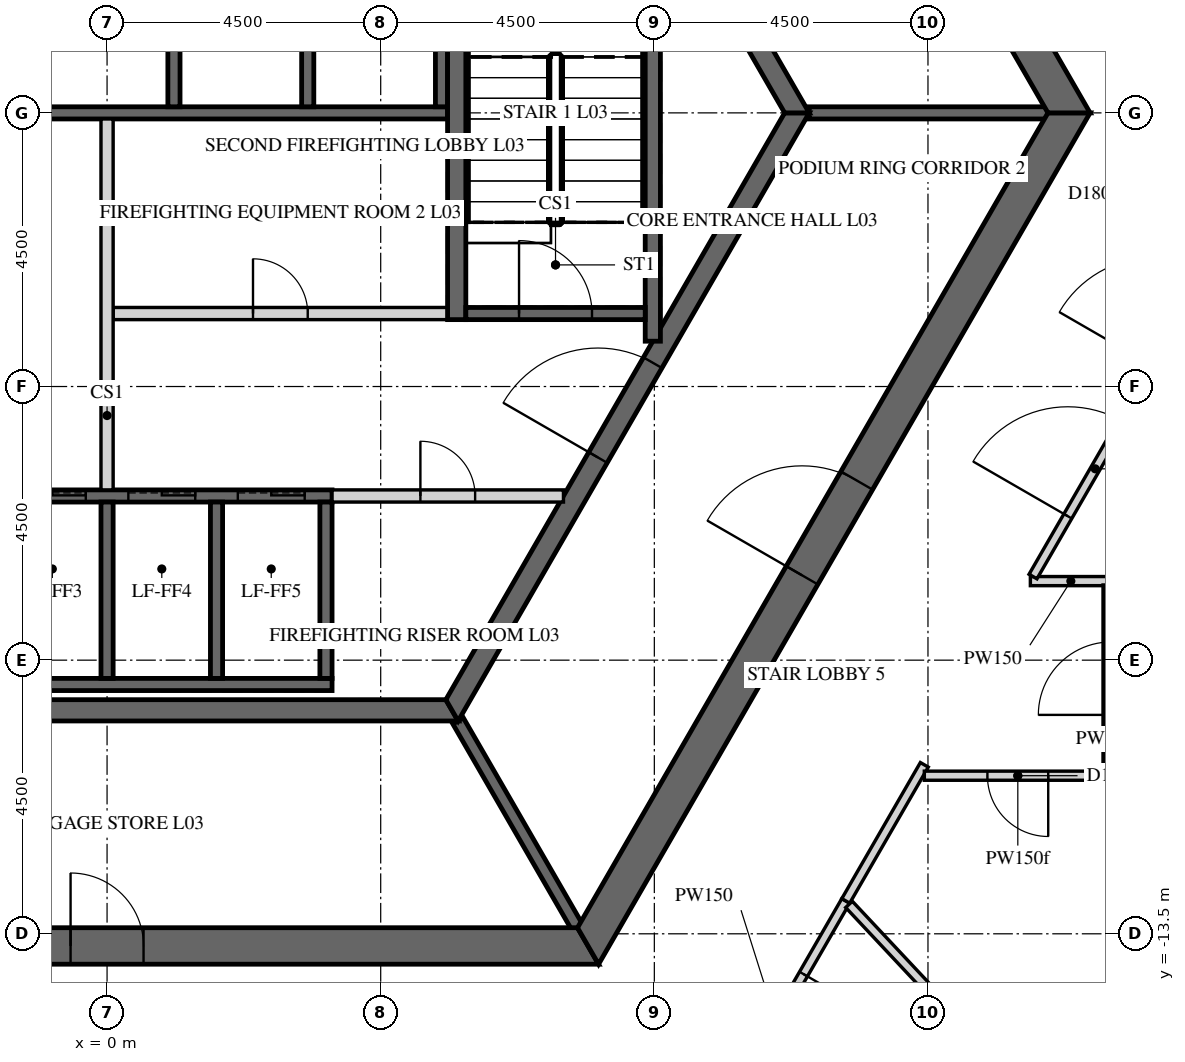
"""IFC4 building model, lengths in metres.
Left out: names, types, materials, properties, quantities, classifications, styles, units other than length and angle.
Written with IfcOpenShell. Run it as: python <this file> out.ifc"""

import sys

from ifc_helpers import new_model, si_unit, direction, frame, frame_2d, origin, place, context, subcontext, project, spatial, polyline, rectangle, outline, extrude, element, fill, save


model = new_model("IFC4")
c1 = context("Model", 3, precision=1e-05, world=origin(), true_north=direction((0.0, 1.0)))
c2 = subcontext(c1, "Body", "Model", "MODEL_VIEW")
j1 = project(units=[si_unit("LENGTHUNIT", "METRE"), si_unit("PLANEANGLEUNIT", "RADIAN")], contexts=[c1])
p1 = place(None, origin())
s1 = spatial("IfcSite", under=j1, at=p1, CompositionType="ELEMENT")
p2 = place(p1, origin())
s2 = spatial("IfcBuilding", under=s1, at=p2, CompositionType="ELEMENT")
p3 = place(p2, frame((0.0, 0.0, 20.5)))
s3 = spatial("IfcBuildingStorey", under=s2, at=p3, CompositionType="ELEMENT", Elevation=20.5)
p4 = place(p3, frame((-7.91, -13.7, -0.25), z_axis=(0.0, 0.0, 1.0), x_axis=(1.0, 0.0, 0.0)))
e1 = element("IfcWall", 1, at=p4, inside=s3, PredefinedType="SHEAR", context=c2, shape_type="SweptSolid", body=[
    extrude(outline(polyline([(-0.173, -0.3), (15.993, -0.3), (15.646, 0.3), (0.173, 0.3), (-0.173, -0.3)])), origin(), (0.0, 0.0, 1.0), 5.5),
])
p5 = place(p4, frame((7.31, 0.0, 0.25)))
e2 = element("IfcOpeningElement", 2, at=p5, cuts=e1, PredefinedType="OPENING", context=c2, shape_type="SweptSolid", body=[
    extrude(rectangle(XDim=1.2, YDim=2.4, at=frame_2d((0.6, 1.2))), frame((0.0, 0.31, 0.0), z_axis=(0.0, -1.0, 0.0), x_axis=(1.0, 0.0, 0.0)), (0.0, 0.0, 1.0), 0.62),
])
p6 = place(p3, frame((7.91, -13.7, -0.25), z_axis=(0.0, 0.0, 1.0), x_axis=(0.499999880136, 0.866025472988, 0.0)))
e3 = element("IfcWall", 3, at=p6, inside=s3, PredefinedType="SHEAR", context=c2, shape_type="SweptSolid", body=[
    extrude(outline(polyline([(-0.173, -0.3), (15.993, -0.3), (15.646, 0.3), (0.173, 0.3), (-0.173, -0.3)])), origin(), (0.0, 0.0, 1.0), 5.5),
])
p7 = place(p6, frame((7.039, 0.0, 0.25)))
e4 = element("IfcOpeningElement", 4, at=p7, cuts=e3, PredefinedType="OPENING", context=c2, shape_type="SweptSolid", body=[
    extrude(rectangle(XDim=1.8, YDim=2.4, at=frame_2d((0.9, 1.2))), frame((0.0, 0.31, 0.0), z_axis=(0.0, -1.0, 0.0), x_axis=(1.0, 0.0, 0.0)), (0.0, 0.0, 1.0), 0.62),
])
p8 = place(p3, frame((15.819, 0.0, -0.25), z_axis=(0.0, 0.0, 1.0), x_axis=(-0.499999880136, 0.866025472988, 0.0)))
e5 = element("IfcWall", 5, at=p8, inside=s3, PredefinedType="SHEAR", context=c2, shape_type="SweptSolid", body=[
    extrude(outline(polyline([(-0.173, -0.3), (15.993, -0.3), (15.646, 0.3), (0.173, 0.3), (-0.173, -0.3)])), origin(), (0.0, 0.0, 1.0), 5.5),
])
p9 = place(p8, frame((6.981, 0.0, 0.25)))
e6 = element("IfcOpeningElement", 6, at=p9, cuts=e5, PredefinedType="OPENING", context=c2, shape_type="SweptSolid", body=[
    extrude(rectangle(XDim=1.8, YDim=2.4, at=frame_2d((0.9, 1.2))), frame((0.0, 0.31, 0.0), z_axis=(0.0, -1.0, 0.0), x_axis=(1.0, 0.0, 0.0)), (0.0, 0.0, 1.0), 0.62),
])
p10 = place(p3, frame((-5.673, -9.825, -0.25), z_axis=(0.0, 0.0, 1.0), x_axis=(1.0, 0.0, 0.0)))
e7 = element("IfcWall", 7, at=p10, inside=s3, PredefinedType="SHEAR", context=c2, shape_type="SweptSolid", body=[
    extrude(outline(polyline([(-0.101, -0.175), (11.446, -0.175), (11.244, 0.175), (0.101, 0.175), (-0.101, -0.175)])), origin(), (0.0, 0.0, 1.0), 5.5),
])
p11 = place(p3, frame((5.673, -9.825, -0.25), z_axis=(0.0, 0.0, 1.0), x_axis=(0.499995046907, 0.866028263435, 0.0)))
e8 = element("IfcWall", 8, at=p11, inside=s3, PredefinedType="SHEAR", context=c2, shape_type="SweptSolid", body=[
    extrude(outline(polyline([(-0.101, -0.175), (11.446, -0.175), (11.244, 0.175), (0.101, 0.175), (-0.101, -0.175)])), origin(), (0.0, 0.0, 1.0), 5.5),
])
p12 = place(p11, frame((4.801, 0.0, 0.25)))
e9 = element("IfcOpeningElement", 9, at=p12, cuts=e8, PredefinedType="OPENING", context=c2, shape_type="SweptSolid", body=[
    extrude(rectangle(XDim=1.8, YDim=2.4, at=frame_2d((0.9, 1.2))), frame((0.0, 0.185, 0.0), z_axis=(0.0, -1.0, 0.0), x_axis=(1.0, 0.0, 0.0)), (0.0, 0.0, 1.0), 0.37),
])
p13 = place(p3, frame((11.345, 0.0, -0.25), z_axis=(0.0, 0.0, 1.0), x_axis=(-0.499995046907, 0.866028263435, 0.0)))
e10 = element("IfcWall", 10, at=p13, inside=s3, PredefinedType="SHEAR", context=c2, shape_type="SweptSolid", body=[
    extrude(outline(polyline([(-0.101, -0.175), (11.446, -0.175), (11.244, 0.175), (0.101, 0.175), (-0.101, -0.175)])), origin(), (0.0, 0.0, 1.0), 5.5),
])
p14 = place(p13, frame((4.744, 0.0, 0.25)))
e11 = element("IfcOpeningElement", 11, at=p14, cuts=e10, PredefinedType="OPENING", context=c2, shape_type="SweptSolid", body=[
    extrude(rectangle(XDim=1.8, YDim=2.4, at=frame_2d((0.9, 1.2))), frame((0.0, 0.185, 0.0), z_axis=(0.0, -1.0, 0.0), x_axis=(1.0, 0.0, 0.0)), (0.0, 0.0, 1.0), 0.37),
])
p15 = place(p3, frame((-5.6, 0.0, -0.25), z_axis=(0.0, 0.0, 1.0), x_axis=(1.0, 0.0, 0.0)))
e12 = element("IfcWall", 12, at=p15, inside=s3, PredefinedType="SHEAR", context=c2, shape_type="SweptSolid", body=[
    extrude(rectangle(XDim=11.2, YDim=0.2, at=frame_2d((5.6, 0.0))), origin(), (0.0, 0.0, 1.0), 5.5),
])
for number, where, z_axis, x_axis in (
    (13, (1.1, 0.1, -0.25), (0.0, 0.0, 1.0), (0.0, 1.0, 0.0)),
    (14, (3.3, 0.1, -0.25), (0.0, 0.0, 1.0), (0.0, 1.0, 0.0)),
    (15, (5.5, 0.1, -0.25), (0.0, 0.0, 1.0), (0.0, 1.0, 0.0)),
):
    element("IfcWall", number, at=place(p3, frame(where, z_axis=z_axis, x_axis=x_axis)), inside=s3, PredefinedType="SHEAR", context=c2, shape_type="SweptSolid", body=[
        extrude(rectangle(XDim=3.1, YDim=0.2, at=frame_2d((1.55, 0.0))), origin(), (0.0, 0.0, 1.0), 5.5),
    ])
p16 = place(p3, frame((-5.5, -6.3, -0.25), z_axis=(0.0, 0.0, 1.0), x_axis=(1.0, 0.0, 0.0)))
e16 = element("IfcWall", 16, at=p16, inside=s3, PredefinedType="SHEAR", context=c2, shape_type="SweptSolid", body=[
    extrude(rectangle(XDim=9.2, YDim=0.2, at=frame_2d((4.6, 0.0))), origin(), (0.0, 0.0, 1.0), 5.5),
])
p17 = place(p16, frame((0.45, 0.0, 0.25)))
e17 = element("IfcOpeningElement", 17, at=p17, cuts=e16, PredefinedType="OPENING", context=c2, shape_type="SweptSolid", body=[
    extrude(rectangle(XDim=1.1, YDim=2.1, at=frame_2d((0.55, 1.05))), frame((0.0, 0.11, 0.0), z_axis=(0.0, -1.0, 0.0), x_axis=(1.0, 0.0, 0.0)), (0.0, 0.0, 1.0), 0.22),
])
p18 = place(p16, frame((2.25, 0.0, 0.25)))
e18 = element("IfcOpeningElement", 18, at=p18, cuts=e16, PredefinedType="OPENING", context=c2, shape_type="SweptSolid", body=[
    extrude(rectangle(XDim=1.1, YDim=2.1, at=frame_2d((0.55, 1.05))), frame((0.0, 0.11, 0.0), z_axis=(0.0, -1.0, 0.0), x_axis=(1.0, 0.0, 0.0)), (0.0, 0.0, 1.0), 0.22),
])
p19 = place(p16, frame((4.05, 0.0, 0.25)))
e19 = element("IfcOpeningElement", 19, at=p19, cuts=e16, PredefinedType="OPENING", context=c2, shape_type="SweptSolid", body=[
    extrude(rectangle(XDim=1.1, YDim=2.1, at=frame_2d((0.55, 1.05))), frame((0.0, 0.11, 0.0), z_axis=(0.0, -1.0, 0.0), x_axis=(1.0, 0.0, 0.0)), (0.0, 0.0, 1.0), 0.22),
])
p20 = place(p16, frame((5.85, 0.0, 0.25)))
e20 = element("IfcOpeningElement", 20, at=p20, cuts=e16, PredefinedType="OPENING", context=c2, shape_type="SweptSolid", body=[
    extrude(rectangle(XDim=1.1, YDim=2.1, at=frame_2d((0.55, 1.05))), frame((0.0, 0.11, 0.0), z_axis=(0.0, -1.0, 0.0), x_axis=(1.0, 0.0, 0.0)), (0.0, 0.0, 1.0), 0.22),
])
p21 = place(p16, frame((7.65, 0.0, 0.25)))
e21 = element("IfcOpeningElement", 21, at=p21, cuts=e16, PredefinedType="OPENING", context=c2, shape_type="SweptSolid", body=[
    extrude(rectangle(XDim=1.1, YDim=2.1, at=frame_2d((0.55, 1.05))), frame((0.0, 0.11, 0.0), z_axis=(0.0, -1.0, 0.0), x_axis=(1.0, 0.0, 0.0)), (0.0, 0.0, 1.0), 0.22),
])
p22 = place(p3, frame((-5.5, -9.4, -0.25), z_axis=(0.0, 0.0, 1.0), x_axis=(1.0, 0.0, 0.0)))
e22 = element("IfcWall", 22, at=p22, inside=s3, PredefinedType="SHEAR", context=c2, shape_type="SweptSolid", body=[
    extrude(rectangle(XDim=9.2, YDim=0.2, at=frame_2d((4.6, 0.0))), origin(), (0.0, 0.0, 1.0), 5.5),
])
for number, where, z_axis, x_axis in (
    (23, (0.0, -9.3, -0.25), (0.0, 0.0, 1.0), (0.0, 1.0, 0.0)),
    (24, (1.8, -9.3, -0.25), (0.0, 0.0, 1.0), (0.0, 1.0, 0.0)),
    (25, (3.6, -9.3, -0.25), (0.0, 0.0, 1.0), (0.0, 1.0, 0.0)),
):
    element("IfcWall", number, at=place(p3, frame(where, z_axis=z_axis, x_axis=x_axis)), inside=s3, PredefinedType="SHEAR", context=c2, shape_type="SweptSolid", body=[
        extrude(rectangle(XDim=2.9, YDim=0.2, at=frame_2d((1.45, 0.0))), origin(), (0.0, 0.0, 1.0), 5.5),
    ])
p23 = place(p3, frame((0.1, -3.3, 0.0), z_axis=(0.0, 0.0, 1.0), x_axis=(1.0, 0.0, 0.0)))
e26 = element("IfcWall", 26, at=p23, inside=s3, PredefinedType="PARTITIONING", context=c2, shape_type="SweptSolid", body=[
    extrude(rectangle(XDim=5.5, YDim=0.2, at=frame_2d((2.75, 0.0))), origin(), (0.0, 0.0, 1.0), 5.25),
])
p24 = place(p23, frame((2.3, 0.0, 0.0)))
e27 = element("IfcOpeningElement", 27, at=p24, cuts=e26, PredefinedType="OPENING", context=c2, shape_type="SweptSolid", body=[
    extrude(rectangle(XDim=0.9, YDim=2.1, at=frame_2d((0.45, 1.05))), frame((0.0, 0.11, 0.0), z_axis=(0.0, -1.0, 0.0), x_axis=(1.0, 0.0, 0.0)), (0.0, 0.0, 1.0), 0.22),
])
p25 = place(p3, frame((0.0, -6.2, 0.0), z_axis=(0.0, 0.0, 1.0), x_axis=(0.0, 1.0, 0.0)))
e28 = element("IfcWall", 28, at=p25, inside=s3, PredefinedType="PARTITIONING", context=c2, shape_type="SweptSolid", body=[
    extrude(rectangle(XDim=6.1, YDim=0.2, at=frame_2d((3.05, 0.0))), origin(), (0.0, 0.0, 1.0), 5.25),
])
p26 = place(p3, frame((3.7, -6.3, 0.0), z_axis=(0.0, 0.0, 1.0), x_axis=(1.0, 0.0, 0.0)))
e29 = element("IfcWall", 29, at=p26, inside=s3, PredefinedType="PARTITIONING", context=c2, shape_type="SweptSolid", body=[
    extrude(rectangle(XDim=3.806, YDim=0.2, at=frame_2d((1.903, 0.0))), origin(), (0.0, 0.0, 1.0), 5.25),
])
p27 = place(p26, frame((1.453, 0.0, 0.0)))
e30 = element("IfcOpeningElement", 30, at=p27, cuts=e29, PredefinedType="OPENING", context=c2, shape_type="SweptSolid", body=[
    extrude(rectangle(XDim=0.9, YDim=2.1, at=frame_2d((0.45, 1.05))), frame((0.0, 0.11, 0.0), z_axis=(0.0, -1.0, 0.0), x_axis=(1.0, 0.0, 0.0)), (0.0, 0.0, 1.0), 0.22),
])
p28 = place(p3, frame((11.547, 0.0, -0.25), z_axis=(0.0, 0.0, 1.0), x_axis=(1.0, 0.0, 0.0)))
e31 = element("IfcWall", 31, at=p28, inside=s3, PredefinedType="SHEAR", context=c2, shape_type="SweptSolid", body=[
    extrude(rectangle(XDim=3.926, YDim=0.2, at=frame_2d((1.963, 0.0))), origin(), (0.0, 0.0, 1.0), 5.5),
])
p29 = place(p3, frame((5.773, -10.0, -0.25), z_axis=(0.0, 0.0, 1.0), x_axis=(0.500038251005, -0.86600331843, 0.0)))
e32 = element("IfcWall", 32, at=p29, inside=s3, PredefinedType="SHEAR", context=c2, shape_type="SweptSolid", body=[
    extrude(rectangle(XDim=3.926, YDim=0.2, at=frame_2d((1.963, 0.0))), origin(), (0.0, 0.0, 1.0), 5.5),
])
p30 = place(p3, frame((5.75, -3.4, -0.25), z_axis=(0.0, 0.0, 1.0), x_axis=(0.0, 1.0, 0.0)))
e33 = element("IfcWall", 33, at=p30, inside=s3, PredefinedType="SHEAR", context=c2, shape_type="SweptSolid", body=[
    extrude(rectangle(XDim=6.8, YDim=0.3, at=frame_2d((3.4, 0.0))), origin(), (0.0, 0.0, 1.0), 5.5),
])
p31 = place(p3, frame((8.975, -3.755, -0.25), z_axis=(0.0, 0.0, 1.0), x_axis=(0.0, 1.0, 0.0)))
e34 = element("IfcWall", 34, at=p31, inside=s3, PredefinedType="SHEAR", context=c2, shape_type="SweptSolid", body=[
    extrude(rectangle(XDim=7.51, YDim=0.25, at=frame_2d((3.755, 0.0))), origin(), (0.0, 0.0, 1.0), 5.5),
])
p32 = place(p3, frame((5.9, -3.3, -0.25), z_axis=(0.0, 0.0, 1.0), x_axis=(1.0, 0.0, 0.0)))
e35 = element("IfcWall", 35, at=p32, inside=s3, PredefinedType="SHEAR", context=c2, shape_type="SweptSolid", body=[
    extrude(rectangle(XDim=2.95, YDim=0.2, at=frame_2d((1.475, 0.0))), origin(), (0.0, 0.0, 1.0), 5.5),
])
p33 = place(p32, frame((0.875, 0.0, 0.25)))
e36 = element("IfcOpeningElement", 36, at=p33, cuts=e35, PredefinedType="OPENING", context=c2, shape_type="SweptSolid", body=[
    extrude(rectangle(XDim=1.2, YDim=2.4, at=frame_2d((0.6, 1.2))), frame((0.0, 0.11, 0.0), z_axis=(0.0, -1.0, 0.0), x_axis=(1.0, 0.0, 0.0)), (0.0, 0.0, 1.0), 0.22),
])
p34 = place(p3, frame((12.148, -12.959, 0.0), z_axis=(0.0, 0.0, 1.0), x_axis=(-0.499957811549, -0.866049759928, 0.0)))
e37 = element("IfcWall", 37, at=p34, inside=s3, PredefinedType="PARTITIONING", context=c2, shape_type="SweptSolid", body=[
    extrude(rectangle(XDim=4.58, YDim=0.15, at=frame_2d((2.29, 0.0))), origin(), (0.0, 0.0, 1.0), 5.25),
])
p35 = place(p34, frame((1.39, 0.0, 0.0)))
e38 = element("IfcOpeningElement", 38, at=p35, cuts=e37, PredefinedType="OPENING", context=c2, shape_type="SweptSolid", body=[
    extrude(rectangle(XDim=1.8, YDim=2.1, at=frame_2d((0.9, 1.05))), frame((0.0, 0.085, 0.0), z_axis=(0.0, -1.0, 0.0), x_axis=(1.0, 0.0, 0.0)), (0.0, 0.0, 1.0), 0.17),
])
p36 = place(p3, frame((12.148, -12.959, 0.0), z_axis=(0.0, 0.0, 1.0), x_axis=(0.499959617396, 0.866048717436, 0.0)))
e39 = element("IfcWall", 39, at=p36, inside=s3, PredefinedType="PARTITIONING", context=c2, shape_type="SweptSolid", body=[
    extrude(rectangle(XDim=2.584, YDim=0.15, at=frame_2d((1.292, 0.0))), origin(), (0.0, 0.0, 1.0), 5.25),
])
p37 = place(p3, frame((15.184, -7.7, 0.0), z_axis=(0.0, 0.0, 1.0), x_axis=(1.0, 0.0, 0.0)))
e40 = element("IfcWall", 40, at=p37, inside=s3, PredefinedType="PARTITIONING", context=c2, shape_type="SweptSolid", body=[
    extrude(rectangle(XDim=1.331, YDim=0.15, at=frame_2d((0.666, 0.0))), origin(), (0.0, 0.0, 1.0), 5.25),
])
p38 = place(p3, frame((15.227, -7.625, 0.0), z_axis=(0.0, 0.0, 1.0), x_axis=(0.500053906551, 0.865994278585, 0.0)))
e41 = element("IfcWall", 41, at=p38, inside=s3, PredefinedType="PARTITIONING", context=c2, shape_type="SweptSolid", body=[
    extrude(rectangle(XDim=6.928, YDim=0.15, at=frame_2d((3.464, 0.0))), origin(), (0.0, 0.0, 1.0), 5.25),
])
p39 = place(p38, frame((1.146, 0.0, 0.0)))
e42 = element("IfcOpeningElement", 42, at=p39, cuts=e41, PredefinedType="OPENING", context=c2, shape_type="SweptSolid", body=[
    extrude(rectangle(XDim=1.8, YDim=2.1, at=frame_2d((0.9, 1.05))), frame((0.0, 0.085, 0.0), z_axis=(0.0, -1.0, 0.0), x_axis=(1.0, 0.0, 0.0)), (0.0, 0.0, 1.0), 0.17),
])
p40 = place(p38, frame((3.983, 0.0, 0.0)))
e43 = element("IfcOpeningElement", 43, at=p40, cuts=e41, PredefinedType="OPENING", context=c2, shape_type="SweptSolid", body=[
    extrude(rectangle(XDim=1.8, YDim=2.1, at=frame_2d((0.9, 1.05))), frame((0.0, 0.085, 0.0), z_axis=(0.0, -1.0, 0.0), x_axis=(1.0, 0.0, 0.0)), (0.0, 0.0, 1.0), 0.17),
])
p41 = place(p3, frame((16.515, -10.9, 0.0), z_axis=(0.0, 0.0, 1.0), x_axis=(-1.0, 0.0, 0.0)))
e44 = element("IfcWall", 44, at=p41, inside=s3, PredefinedType="PARTITIONING", context=c2, shape_type="SweptSolid", body=[
    extrude(rectangle(XDim=3.075, YDim=0.15, at=frame_2d((1.538, 0.0))), origin(), (0.0, 0.0, 1.0), 4.496),
])
p42 = place(p41, frame((1.038, 0.0, 0.0)))
e45 = element("IfcOpeningElement", 45, at=p42, cuts=e44, PredefinedType="OPENING", context=c2, shape_type="SweptSolid", body=[
    extrude(rectangle(XDim=1.0, YDim=2.1, at=frame_2d((0.5, 1.05))), frame((0.0, 0.085, 0.0), z_axis=(0.0, -1.0, 0.0), x_axis=(1.0, 0.0, 0.0)), (0.0, 0.0, 1.0), 0.17),
])
p43 = place(p3, frame((16.515, -10.825, 0.0), z_axis=(0.0, 0.0, 1.0), x_axis=(0.0, 1.0, 0.0)))
e46 = element("IfcWall", 46, at=p43, inside=s3, PredefinedType="PARTITIONING", context=c2, shape_type="SweptSolid", body=[
    extrude(rectangle(XDim=3.05, YDim=0.25, at=frame_2d((1.525, 0.0))), origin(), (0.0, 0.0, 1.0), 5.25),
])
p44 = place(p43, frame((0.925, 0.0, 0.0)))
e47 = element("IfcOpeningElement", 47, at=p44, cuts=e46, PredefinedType="OPENING", context=c2, shape_type="SweptSolid", body=[
    extrude(rectangle(XDim=1.2, YDim=2.1, at=frame_2d((0.6, 1.05))), frame((0.0, 0.135, 0.0), z_axis=(0.0, -1.0, 0.0), x_axis=(1.0, 0.0, 0.0)), (0.0, 0.0, 1.0), 0.27),
])
p45 = place(p3, frame((20.795, -22.182, 0.0), z_axis=(0.0, 0.0, 1.0), x_axis=(-0.683955995382, 0.729523266511, 0.0)))
e48 = element("IfcWall", 48, at=p45, inside=s3, PredefinedType="PARTITIONING", context=c2, shape_type="SweptSolid", body=[
    extrude(rectangle(XDim=12.564, YDim=0.15, at=frame_2d((6.282, 0.0))), origin(), (0.0, 0.0, 1.0), 4.496),
])
p46 = place(p7, origin())
e49 = element("IfcDoor", 49, at=p46, inside=s3, OperationType="DOUBLE_DOOR_SINGLE_SWING", PredefinedType="DOOR", context=c2, shape_type="SweptSolid", body=[
    extrude(rectangle(XDim=1.8, YDim=2.4, at=frame_2d((0.9, 1.2))), frame((0.0, 0.025, 0.0), z_axis=(0.0, -1.0, 0.0), x_axis=(1.0, 0.0, 0.0)), (0.0, 0.0, 1.0), 0.05),
])
fill(e4, e49)
p47 = place(p5, origin())
e50 = element("IfcDoor", 50, at=p47, inside=s3, OperationType="SINGLE_SWING_LEFT", PredefinedType="DOOR", context=c2, shape_type="SweptSolid", body=[
    extrude(rectangle(XDim=1.2, YDim=2.4, at=frame_2d((0.6, 1.2))), frame((0.0, 0.025, 0.0), z_axis=(0.0, -1.0, 0.0), x_axis=(1.0, 0.0, 0.0)), (0.0, 0.0, 1.0), 0.05),
])
fill(e2, e50)
p48 = place(p12, origin())
e51 = element("IfcDoor", 51, at=p48, inside=s3, OperationType="DOUBLE_DOOR_SINGLE_SWING", PredefinedType="DOOR", context=c2, shape_type="SweptSolid", body=[
    extrude(rectangle(XDim=1.8, YDim=2.4, at=frame_2d((0.9, 1.2))), frame((0.0, 0.025, 0.0), z_axis=(0.0, -1.0, 0.0), x_axis=(1.0, 0.0, 0.0)), (0.0, 0.0, 1.0), 0.05),
])
fill(e9, e51)
p49 = place(p24, origin())
e52 = element("IfcDoor", 52, at=p49, inside=s3, OperationType="SINGLE_SWING_LEFT", PredefinedType="DOOR", context=c2, shape_type="SweptSolid", body=[
    extrude(rectangle(XDim=0.9, YDim=2.1, at=frame_2d((0.45, 1.05))), frame((0.0, 0.025, 0.0), z_axis=(0.0, -1.0, 0.0), x_axis=(1.0, 0.0, 0.0)), (0.0, 0.0, 1.0), 0.05),
])
fill(e27, e52)
p50 = place(p27, origin())
e53 = element("IfcDoor", 53, at=p50, inside=s3, OperationType="SINGLE_SWING_LEFT", PredefinedType="DOOR", context=c2, shape_type="SweptSolid", body=[
    extrude(rectangle(XDim=0.9, YDim=2.1, at=frame_2d((0.45, 1.05))), frame((0.0, 0.025, 0.0), z_axis=(0.0, -1.0, 0.0), x_axis=(1.0, 0.0, 0.0)), (0.0, 0.0, 1.0), 0.05),
])
fill(e30, e53)
p51 = place(p33, origin())
e54 = element("IfcDoor", 54, at=p51, inside=s3, OperationType="SINGLE_SWING_LEFT", PredefinedType="DOOR", context=c2, shape_type="SweptSolid", body=[
    extrude(rectangle(XDim=1.2, YDim=2.4, at=frame_2d((0.6, 1.2))), frame((0.0, 0.025, 0.0), z_axis=(0.0, -1.0, 0.0), x_axis=(1.0, 0.0, 0.0)), (0.0, 0.0, 1.0), 0.05),
])
fill(e36, e54)
p52 = place(p19, origin())
e55 = element("IfcDoor", 55, at=p52, inside=s3, OperationType="SLIDING_TO_LEFT", PredefinedType="DOOR", context=c2, shape_type="SweptSolid", body=[
    extrude(rectangle(XDim=1.1, YDim=2.1, at=frame_2d((0.55, 1.05))), frame((0.0, 0.025, 0.0), z_axis=(0.0, -1.0, 0.0), x_axis=(1.0, 0.0, 0.0)), (0.0, 0.0, 1.0), 0.05),
])
fill(e19, e55)
p53 = place(p20, origin())
e56 = element("IfcDoor", 56, at=p53, inside=s3, OperationType="SLIDING_TO_LEFT", PredefinedType="DOOR", context=c2, shape_type="SweptSolid", body=[
    extrude(rectangle(XDim=1.1, YDim=2.1, at=frame_2d((0.55, 1.05))), frame((0.0, 0.025, 0.0), z_axis=(0.0, -1.0, 0.0), x_axis=(1.0, 0.0, 0.0)), (0.0, 0.0, 1.0), 0.05),
])
fill(e20, e56)
p54 = place(p21, origin())
e57 = element("IfcDoor", 57, at=p54, inside=s3, OperationType="SLIDING_TO_LEFT", PredefinedType="DOOR", context=c2, shape_type="SweptSolid", body=[
    extrude(rectangle(XDim=1.1, YDim=2.1, at=frame_2d((0.55, 1.05))), frame((0.0, 0.025, 0.0), z_axis=(0.0, -1.0, 0.0), x_axis=(1.0, 0.0, 0.0)), (0.0, 0.0, 1.0), 0.05),
])
fill(e21, e57)
p55 = place(p35, origin())
e58 = element("IfcDoor", 58, at=p55, inside=s3, OperationType="DOUBLE_DOOR_SINGLE_SWING", PredefinedType="DOOR", context=c2, shape_type="SweptSolid", body=[
    extrude(rectangle(XDim=1.8, YDim=2.1, at=frame_2d((0.9, 1.05))), frame((0.0, 0.025, 0.0), z_axis=(0.0, -1.0, 0.0), x_axis=(1.0, 0.0, 0.0)), (0.0, 0.0, 1.0), 0.05),
])
fill(e38, e58)
p56 = place(p39, origin())
e59 = element("IfcDoor", 59, at=p56, inside=s3, OperationType="DOUBLE_DOOR_SINGLE_SWING", PredefinedType="DOOR", context=c2, shape_type="SweptSolid", body=[
    extrude(rectangle(XDim=1.8, YDim=2.1, at=frame_2d((0.9, 1.05))), frame((0.0, 0.025, 0.0), z_axis=(0.0, -1.0, 0.0), x_axis=(1.0, 0.0, 0.0)), (0.0, 0.0, 1.0), 0.05),
])
fill(e42, e59)
p57 = place(p42, origin())
e60 = element("IfcDoor", 60, at=p57, inside=s3, OperationType="SINGLE_SWING_LEFT", PredefinedType="DOOR", context=c2, shape_type="SweptSolid", body=[
    extrude(rectangle(XDim=1.0, YDim=2.1, at=frame_2d((0.5, 1.05))), frame((0.0, 0.025, 0.0), z_axis=(0.0, -1.0, 0.0), x_axis=(1.0, 0.0, 0.0)), (0.0, 0.0, 1.0), 0.05),
])
fill(e45, e60)
save(model, sys.argv[1])
